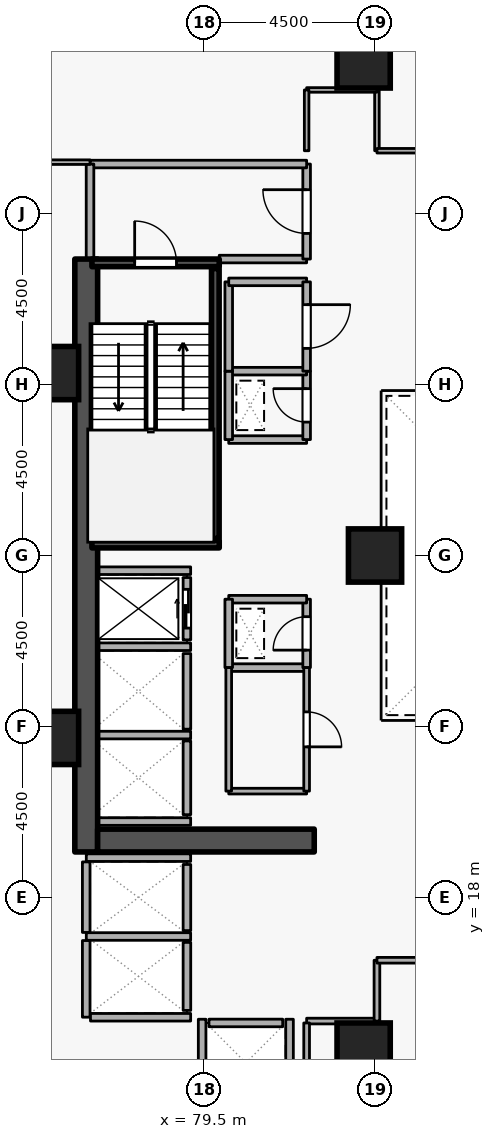
"""IFC4 building model, lengths in metres.
Left out: names, types, materials, properties, quantities, classifications, styles, units other than length and angle.
Written with IfcOpenShell. Run it as: python <this file> out.ifc"""

import sys

from ifc_helpers import new_model, si_unit, direction, frame, frame_2d, origin, origin_2d, place, context, subcontext, project, spatial, rectangle, extrude, element, fill, save


model = new_model("IFC4")
c1 = context("Model", 3, precision=1e-05, world=origin(), true_north=direction((0.0, 1.0)))
c2 = subcontext(c1, "Body", "Model", "MODEL_VIEW")
j1 = project(units=[si_unit("LENGTHUNIT", "METRE"), si_unit("PLANEANGLEUNIT", "RADIAN")], contexts=[c1])
p1 = place(None, origin())
s1 = spatial("IfcSite", under=j1, at=p1, CompositionType="ELEMENT")
p2 = place(p1, origin())
s2 = spatial("IfcBuilding", under=s1, at=p2, CompositionType="ELEMENT")
p3 = place(p2, frame((0.0, 0.0, 35.1)))
s3 = spatial("IfcBuildingStorey", under=s2, at=p3, CompositionType="ELEMENT", Elevation=35.1)
p4 = place(p3, frame((76.4, 19.2, 0.0), z_axis=(0.0, 0.0, 1.0), x_axis=(0.0, 1.0, 0.0)))
e1 = element("IfcWall", 1, at=p4, inside=s3, PredefinedType="SHEAR", context=c2, shape_type="SweptSolid", body=[
    extrude(rectangle(XDim=15.6, YDim=0.6, at=frame_2d((7.8, 0.0))), origin(), (0.0, 0.0, 1.0), 3.6),
])
p5 = place(p3, frame((76.7, 19.5, 0.0), z_axis=(0.0, 0.0, 1.0), x_axis=(1.0, 0.0, 0.0)))
e2 = element("IfcWall", 2, at=p5, inside=s3, PredefinedType="SHEAR", context=c2, shape_type="SweptSolid", body=[
    extrude(rectangle(XDim=5.7, YDim=0.6, at=frame_2d((2.85, 0.0))), origin(), (0.0, 0.0, 1.0), 3.6),
])
for number, where, z_axis, x_axis in (
    (3, (83.7, 14.0, 0.0), (0.0, 0.0, 1.0), (1.0, 0.0, 0.0)),
    (4, (83.7, 40.0, 0.0), (0.0, 0.0, 1.0), (1.0, 0.0, 0.0)),
    (5, (75.5, 22.2, 0.0), (0.0, 0.0, 1.0), (1.0, 0.0, 0.0)),
    (6, (75.5, 31.8, 0.0), (0.0, 0.0, 1.0), (1.0, 0.0, 0.0)),
    (7, (84.0, 27.0, 0.0), (0.0, 0.0, 1.0), (1.0, 0.0, 0.0)),
):
    element("IfcColumn", number, at=place(p3, frame(where, z_axis=z_axis, x_axis=x_axis)), inside=s3, PredefinedType="COLUMN", context=c2, shape_type="SweptSolid", body=[
        extrude(rectangle(XDim=1.4, YDim=1.4, at=origin_2d()), origin(), (0.0, 0.0, 1.0), 3.6),
    ])
p6 = place(p3, frame((79.05, 24.78, 0.0), z_axis=(0.0, 0.0, 1.0), x_axis=(0.0, 1.0, 0.0)))
e8 = element("IfcWall", 8, at=p6, inside=s3, PredefinedType="STANDARD", context=c2, shape_type="SweptSolid", body=[
    extrude(rectangle(XDim=1.64, YDim=0.2, at=frame_2d((0.82, 0.0))), origin(), (0.0, 0.0, 1.0), 3.34),
])
p7 = place(p6, frame((0.31, 0.0, 0.0)))
e9 = element("IfcOpeningElement", 9, at=p7, cuts=e8, PredefinedType="OPENING", context=c2, shape_type="SweptSolid", body=[
    extrude(rectangle(XDim=1.02, YDim=2.06, at=frame_2d((0.51, 1.03))), frame((0.0, 0.11, 0.0), z_axis=(0.0, -1.0, 0.0), x_axis=(1.0, 0.0, 0.0)), (0.0, 0.0, 1.0), 0.22),
])
p8 = place(p3, frame((79.05, 22.43, 0.0), z_axis=(0.0, 0.0, 1.0), x_axis=(0.0, 1.0, 0.0)))
e10 = element("IfcWall", 10, at=p8, inside=s3, PredefinedType="STANDARD", context=c2, shape_type="SweptSolid", body=[
    extrude(rectangle(XDim=1.99, YDim=0.2, at=frame_2d((0.995, 0.0))), origin(), (0.0, 0.0, 1.0), 3.34),
])
p9 = place(p3, frame((79.05, 20.18, 0.0), z_axis=(0.0, 0.0, 1.0), x_axis=(0.0, 1.0, 0.0)))
e11 = element("IfcWall", 11, at=p9, inside=s3, PredefinedType="STANDARD", context=c2, shape_type="SweptSolid", body=[
    extrude(rectangle(XDim=1.94, YDim=0.2, at=frame_2d((0.97, 0.0))), origin(), (0.0, 0.0, 1.0), 3.34),
])
p10 = place(p3, frame((79.05, 17.13, 0.0), z_axis=(0.0, 0.0, 1.0), x_axis=(0.0, 1.0, 0.0)))
e12 = element("IfcWall", 12, at=p10, inside=s3, PredefinedType="STANDARD", context=c2, shape_type="SweptSolid", body=[
    extrude(rectangle(XDim=1.74, YDim=0.2, at=frame_2d((0.87, 0.0))), origin(), (0.0, 0.0, 1.0), 3.34),
])
p11 = place(p3, frame((79.05, 15.03, 0.0), z_axis=(0.0, 0.0, 1.0), x_axis=(0.0, 1.0, 0.0)))
e13 = element("IfcWall", 13, at=p11, inside=s3, PredefinedType="STANDARD", context=c2, shape_type="SweptSolid", body=[
    extrude(rectangle(XDim=1.79, YDim=0.2, at=frame_2d((0.895, 0.0))), origin(), (0.0, 0.0, 1.0), 3.34),
])
p12 = place(p3, frame((79.63, 14.7, 0.0), z_axis=(0.0, 0.0, 1.0), x_axis=(1.0, 0.0, 0.0)))
e14 = element("IfcWall", 14, at=p12, inside=s3, PredefinedType="STANDARD", context=c2, shape_type="SweptSolid", body=[
    extrude(rectangle(XDim=1.94, YDim=0.2, at=frame_2d((0.97, 0.0))), origin(), (0.0, 0.0, 1.0), 3.34),
])
for number, where, z_axis, x_axis in (
    (15, (76.712, 26.6, 0.0), (0.0, 0.0, 1.0), (1.0, 0.0, 0.0)),
    (16, (76.712, 24.6, 0.0), (0.0, 0.0, 1.0), (1.0, 0.0, 0.0)),
    (17, (76.712, 22.275, 0.0), (0.0, 0.0, 1.0), (1.0, 0.0, 0.0)),
    (18, (76.712, 20.0, 0.0), (0.0, 0.0, 1.0), (1.0, 0.0, 0.0)),
):
    element("IfcWall", number, at=place(p3, frame(where, z_axis=z_axis, x_axis=x_axis)), inside=s3, PredefinedType="STANDARD", context=c2, shape_type="SweptSolid", body=[
        extrude(rectangle(XDim=2.436, YDim=0.2, at=frame_2d((1.218, 0.0))), origin(), (0.0, 0.0, 1.0), 3.34),
    ])
p13 = place(p3, frame((76.402, 19.05, 0.0), z_axis=(0.0, 0.0, 1.0), x_axis=(1.0, 0.0, 0.0)))
e19 = element("IfcWall", 19, at=p13, inside=s3, PredefinedType="STANDARD", context=c2, shape_type="SweptSolid", body=[
    extrude(rectangle(XDim=2.746, YDim=0.2, at=frame_2d((1.373, 0.0))), origin(), (0.0, 0.0, 1.0), 2.545),
])
p14 = place(p3, frame((76.402, 16.975, 0.0), z_axis=(0.0, 0.0, 1.0), x_axis=(1.0, 0.0, 0.0)))
e20 = element("IfcWall", 20, at=p14, inside=s3, PredefinedType="STANDARD", context=c2, shape_type="SweptSolid", body=[
    extrude(rectangle(XDim=2.746, YDim=0.2, at=frame_2d((1.373, 0.0))), origin(), (0.0, 0.0, 1.0), 3.34),
])
p15 = place(p3, frame((76.4, 14.852, 0.0), z_axis=(0.0, 0.0, 1.0), x_axis=(0.0, 1.0, 0.0)))
e21 = element("IfcWall", 21, at=p15, inside=s3, PredefinedType="STANDARD", context=c2, shape_type="SweptSolid", body=[
    extrude(rectangle(XDim=2.016, YDim=0.2, at=frame_2d((1.008, 0.0))), origin(), (0.0, 0.0, 1.0), 3.34),
])
p16 = place(p3, frame((76.4, 17.082, 0.0), z_axis=(0.0, 0.0, 1.0), x_axis=(0.0, 1.0, 0.0)))
e22 = element("IfcWall", 22, at=p16, inside=s3, PredefinedType="STANDARD", context=c2, shape_type="SweptSolid", body=[
    extrude(rectangle(XDim=1.856, YDim=0.2, at=frame_2d((0.928, 0.0))), origin(), (0.0, 0.0, 1.0), 3.34),
])
p17 = place(p3, frame((76.512, 14.85, 0.0), z_axis=(0.0, 0.0, 1.0), x_axis=(1.0, 0.0, 0.0)))
e23 = element("IfcWall", 23, at=p17, inside=s3, PredefinedType="STANDARD", context=c2, shape_type="SweptSolid", body=[
    extrude(rectangle(XDim=2.636, YDim=0.2, at=frame_2d((1.318, 0.0))), origin(), (0.0, 0.0, 1.0), 3.34),
])
for number, where, z_axis, x_axis in (
    (24, (81.75, 12.612, 0.0), (0.0, 0.0, 1.0), (0.0, 1.0, 0.0)),
    (25, (79.45, 12.612, 0.0), (0.0, 0.0, 1.0), (0.0, 1.0, 0.0)),
):
    element("IfcWall", number, at=place(p3, frame(where, z_axis=z_axis, x_axis=x_axis)), inside=s3, PredefinedType="STANDARD", context=c2, shape_type="SweptSolid", body=[
        extrude(rectangle(XDim=2.186, YDim=0.2, at=frame_2d((1.093, 0.0))), origin(), (0.0, 0.0, 1.0), 3.34),
    ])
p18 = place(p3, frame((76.55, 34.7, 0.0), z_axis=(0.0, 0.0, 1.0), x_axis=(1.0, 0.0, 0.0)))
e26 = element("IfcWall", 26, at=p18, inside=s3, PredefinedType="SHEAR", context=c2, shape_type="SweptSolid", body=[
    extrude(rectangle(XDim=3.35, YDim=0.2, at=frame_2d((1.675, 0.0))), origin(), (0.0, 0.0, 1.0), 3.6),
])
p19 = place(p18, frame((1.125, 0.0, 0.0)))
e27 = element("IfcOpeningElement", 27, at=p19, cuts=e26, PredefinedType="OPENING", context=c2, shape_type="SweptSolid", body=[
    extrude(rectangle(XDim=1.1, YDim=2.1, at=frame_2d((0.55, 1.05))), frame((0.0, 0.11, 0.0), z_axis=(0.0, -1.0, 0.0), x_axis=(1.0, 0.0, 0.0)), (0.0, 0.0, 1.0), 0.22),
])
p20 = place(p3, frame((79.9, 27.3, 0.0), z_axis=(0.0, 0.0, 1.0), x_axis=(-1.0, 0.0, 0.0)))
e28 = element("IfcWall", 28, at=p20, inside=s3, PredefinedType="SHEAR", context=c2, shape_type="SweptSolid", body=[
    extrude(rectangle(XDim=3.35, YDim=0.2, at=frame_2d((1.675, 0.0))), origin(), (0.0, 0.0, 1.0), 3.6),
])
p21 = place(p3, frame((79.797, 27.45, 0.0), z_axis=(0.0, 0.0, 1.0), x_axis=(0.0, 1.0, 0.0)))
e29 = element("IfcWall", 29, at=p21, inside=s3, PredefinedType="SHEAR", context=c2, shape_type="SweptSolid", body=[
    extrude(rectangle(XDim=7.1, YDim=0.2, at=frame_2d((3.55, 0.0))), origin(), (0.0, 0.0, 1.0), 3.6),
])
p22 = place(p3, frame((79.9, 34.8, 0.0), z_axis=(0.0, 0.0, 1.0), x_axis=(1.0, 0.0, 0.0)))
e30 = element("IfcWall", 30, at=p22, inside=s3, PredefinedType="STANDARD", context=c2, shape_type="SweptSolid", body=[
    extrude(rectangle(XDim=2.3, YDim=0.2, at=frame_2d((1.15, 0.0))), origin(), (0.0, 0.0, 1.0), 2.545),
])
p23 = place(p3, frame((82.2, 34.8, 0.0), z_axis=(0.0, 0.0, 1.0), x_axis=(0.0, 1.0, 0.0)))
e31 = element("IfcWall", 31, at=p23, inside=s3, PredefinedType="STANDARD", context=c2, shape_type="SweptSolid", body=[
    extrude(rectangle(XDim=2.5, YDim=0.2, at=frame_2d((1.25, 0.0))), origin(), (0.0, 0.0, 1.0), 3.34),
])
p24 = place(p23, frame((0.675, 0.0, 0.0)))
e32 = element("IfcOpeningElement", 32, at=p24, cuts=e31, PredefinedType="OPENING", context=c2, shape_type="SweptSolid", body=[
    extrude(rectangle(XDim=1.15, YDim=2.1, at=frame_2d((0.575, 1.05))), frame((0.0, 0.11, 0.0), z_axis=(0.0, -1.0, 0.0), x_axis=(1.0, 0.0, 0.0)), (0.0, 0.0, 1.0), 0.22),
])
p25 = place(p3, frame((82.2, 37.3, 0.0), z_axis=(0.0, 0.0, 1.0), x_axis=(-1.0, 0.0, 0.0)))
e33 = element("IfcWall", 33, at=p25, inside=s3, PredefinedType="STANDARD", context=c2, shape_type="SweptSolid", body=[
    extrude(rectangle(XDim=5.7, YDim=0.2, at=frame_2d((2.85, 0.0))), origin(), (0.0, 0.0, 1.0), 3.34),
])
p26 = place(p3, frame((76.5, 37.3, 0.0), z_axis=(0.0, 0.0, 1.0), x_axis=(0.0, -1.0, 0.0)))
e34 = element("IfcWall", 34, at=p26, inside=s3, PredefinedType="STANDARD", context=c2, shape_type="SweptSolid", body=[
    extrude(rectangle(XDim=2.5, YDim=0.2, at=frame_2d((1.25, 0.0))), origin(), (0.0, 0.0, 1.0), 3.34),
])
p27 = place(p3, frame((80.15, 24.05, 0.0), z_axis=(0.0, 0.0, 1.0), x_axis=(1.0, 0.0, 0.0)))
e35 = element("IfcWall", 35, at=p27, inside=s3, PredefinedType="STANDARD", context=c2, shape_type="SweptSolid", body=[
    extrude(rectangle(XDim=2.05, YDim=0.2, at=frame_2d((1.025, 0.0))), origin(), (0.0, 0.0, 1.0), 3.34),
])
p28 = place(p3, frame((82.2, 24.05, 0.0), z_axis=(0.0, 0.0, 1.0), x_axis=(0.0, 1.0, 0.0)))
e36 = element("IfcWall", 36, at=p28, inside=s3, PredefinedType="STANDARD", context=c2, shape_type="SweptSolid", body=[
    extrude(rectangle(XDim=1.8, YDim=0.2, at=frame_2d((0.9, 0.0))), origin(), (0.0, 0.0, 1.0), 3.34),
])
p29 = place(p28, frame((0.46, 0.0, 0.0)))
e37 = element("IfcOpeningElement", 37, at=p29, cuts=e36, PredefinedType="OPENING", context=c2, shape_type="SweptSolid", body=[
    extrude(rectangle(XDim=0.88, YDim=2.04, at=frame_2d((0.44, 1.02))), frame((0.0, 0.11, 0.0), z_axis=(0.0, -1.0, 0.0), x_axis=(1.0, 0.0, 0.0)), (0.0, 0.0, 1.0), 0.22),
])
p30 = place(p3, frame((82.2, 25.85, 0.0), z_axis=(0.0, 0.0, 1.0), x_axis=(-1.0, 0.0, 0.0)))
e38 = element("IfcWall", 38, at=p30, inside=s3, PredefinedType="STANDARD", context=c2, shape_type="SweptSolid", body=[
    extrude(rectangle(XDim=2.05, YDim=0.2, at=frame_2d((1.025, 0.0))), origin(), (0.0, 0.0, 1.0), 3.34),
])
p31 = place(p3, frame((80.15, 25.85, 0.0), z_axis=(0.0, 0.0, 1.0), x_axis=(0.0, -1.0, 0.0)))
e39 = element("IfcWall", 39, at=p31, inside=s3, PredefinedType="STANDARD", context=c2, shape_type="SweptSolid", body=[
    extrude(rectangle(XDim=1.8, YDim=0.2, at=frame_2d((0.9, 0.0))), origin(), (0.0, 0.0, 1.0), 3.34),
])
p32 = place(p3, frame((80.15, 30.05, 0.0), z_axis=(0.0, 0.0, 1.0), x_axis=(1.0, 0.0, 0.0)))
e40 = element("IfcWall", 40, at=p32, inside=s3, PredefinedType="STANDARD", context=c2, shape_type="SweptSolid", body=[
    extrude(rectangle(XDim=2.05, YDim=0.2, at=frame_2d((1.025, 0.0))), origin(), (0.0, 0.0, 1.0), 3.34),
])
p33 = place(p3, frame((82.2, 30.05, 0.0), z_axis=(0.0, 0.0, 1.0), x_axis=(0.0, 1.0, 0.0)))
e41 = element("IfcWall", 41, at=p33, inside=s3, PredefinedType="STANDARD", context=c2, shape_type="SweptSolid", body=[
    extrude(rectangle(XDim=1.8, YDim=0.2, at=frame_2d((0.9, 0.0))), origin(), (0.0, 0.0, 1.0), 3.34),
])
p34 = place(p33, frame((0.46, 0.0, 0.0)))
e42 = element("IfcOpeningElement", 42, at=p34, cuts=e41, PredefinedType="OPENING", context=c2, shape_type="SweptSolid", body=[
    extrude(rectangle(XDim=0.88, YDim=2.04, at=frame_2d((0.44, 1.02))), frame((0.0, 0.11, 0.0), z_axis=(0.0, -1.0, 0.0), x_axis=(1.0, 0.0, 0.0)), (0.0, 0.0, 1.0), 0.22),
])
p35 = place(p3, frame((82.2, 31.85, 0.0), z_axis=(0.0, 0.0, 1.0), x_axis=(-1.0, 0.0, 0.0)))
e43 = element("IfcWall", 43, at=p35, inside=s3, PredefinedType="STANDARD", context=c2, shape_type="SweptSolid", body=[
    extrude(rectangle(XDim=2.05, YDim=0.2, at=frame_2d((1.025, 0.0))), origin(), (0.0, 0.0, 1.0), 3.34),
])
p36 = place(p3, frame((80.15, 31.85, 0.0), z_axis=(0.0, 0.0, 1.0), x_axis=(0.0, -1.0, 0.0)))
e44 = element("IfcWall", 44, at=p36, inside=s3, PredefinedType="STANDARD", context=c2, shape_type="SweptSolid", body=[
    extrude(rectangle(XDim=1.8, YDim=0.2, at=frame_2d((0.9, 0.0))), origin(), (0.0, 0.0, 1.0), 3.34),
])
p37 = place(p3, frame((80.15, 31.85, 0.0), z_axis=(0.0, 0.0, 1.0), x_axis=(0.0, 1.0, 0.0)))
e45 = element("IfcWall", 45, at=p37, inside=s3, PredefinedType="STANDARD", context=c2, shape_type="SweptSolid", body=[
    extrude(rectangle(XDim=2.35, YDim=0.2, at=frame_2d((1.175, 0.0))), origin(), (0.0, 0.0, 1.0), 3.34),
])
p38 = place(p3, frame((80.15, 34.2, 0.0), z_axis=(0.0, 0.0, 1.0), x_axis=(1.0, 0.0, 0.0)))
e46 = element("IfcWall", 46, at=p38, inside=s3, PredefinedType="STANDARD", context=c2, shape_type="SweptSolid", body=[
    extrude(rectangle(XDim=2.05, YDim=0.2, at=frame_2d((1.025, 0.0))), origin(), (0.0, 0.0, 1.0), 2.545),
])
p39 = place(p3, frame((82.2, 34.2, 0.0), z_axis=(0.0, 0.0, 1.0), x_axis=(0.0, -1.0, 0.0)))
e47 = element("IfcWall", 47, at=p39, inside=s3, PredefinedType="STANDARD", context=c2, shape_type="SweptSolid", body=[
    extrude(rectangle(XDim=2.35, YDim=0.2, at=frame_2d((1.175, 0.0))), origin(), (0.0, 0.0, 1.0), 3.34),
])
p40 = place(p39, frame((0.6, 0.0, 0.0)))
e48 = element("IfcOpeningElement", 48, at=p40, cuts=e47, PredefinedType="OPENING", context=c2, shape_type="SweptSolid", body=[
    extrude(rectangle(XDim=1.15, YDim=2.1, at=frame_2d((0.575, 1.05))), frame((0.0, 0.11, 0.0), z_axis=(0.0, -1.0, 0.0), x_axis=(1.0, 0.0, 0.0)), (0.0, 0.0, 1.0), 0.22),
])
p41 = place(p3, frame((82.2, 20.8, 0.0), z_axis=(0.0, 0.0, 1.0), x_axis=(-1.0, 0.0, 0.0)))
e49 = element("IfcWall", 49, at=p41, inside=s3, PredefinedType="PARTITIONING", context=c2, shape_type="SweptSolid", body=[
    extrude(rectangle(XDim=2.05, YDim=0.15, at=frame_2d((1.025, 0.0))), origin(), (0.0, 0.0, 1.0), 3.34),
])
p42 = place(p3, frame((80.15, 20.8, 0.0), z_axis=(0.0, 0.0, 1.0), x_axis=(0.0, 1.0, 0.0)))
e50 = element("IfcWall", 50, at=p42, inside=s3, PredefinedType="PARTITIONING", context=c2, shape_type="SweptSolid", body=[
    extrude(rectangle(XDim=3.25, YDim=0.15, at=frame_2d((1.625, 0.0))), origin(), (0.0, 0.0, 1.0), 3.34),
])
p43 = place(p3, frame((82.2, 24.05, 0.0), z_axis=(0.0, 0.0, 1.0), x_axis=(0.0, -1.0, 0.0)))
e51 = element("IfcWall", 51, at=p43, inside=s3, PredefinedType="PARTITIONING", context=c2, shape_type="SweptSolid", body=[
    extrude(rectangle(XDim=3.25, YDim=0.15, at=frame_2d((1.625, 0.0))), origin(), (0.0, 0.0, 1.0), 3.34),
])
p44 = place(p43, frame((1.165, 0.0, 0.0)))
e52 = element("IfcOpeningElement", 52, at=p44, cuts=e51, PredefinedType="OPENING", context=c2, shape_type="SweptSolid", body=[
    extrude(rectangle(XDim=0.92, YDim=2.08, at=frame_2d((0.46, 1.04))), frame((0.0, 0.085, 0.0), z_axis=(0.0, -1.0, 0.0), x_axis=(1.0, 0.0, 0.0)), (0.0, 0.0, 1.0), 0.17),
])
p45 = place(p3, frame((82.2, 14.75, 0.0), z_axis=(0.0, 0.0, 1.0), x_axis=(1.0, 0.0, 0.0)))
e53 = element("IfcWall", 53, at=p45, inside=s3, PredefinedType="PARTITIONING", context=c2, shape_type="SweptSolid", body=[
    extrude(rectangle(XDim=1.85, YDim=0.15, at=frame_2d((0.925, 0.0))), origin(), (0.0, 0.0, 1.0), 3.34),
])
p46 = place(p3, frame((84.05, 14.75, 0.0), z_axis=(0.0, 0.0, 1.0), x_axis=(0.0, 1.0, 0.0)))
e54 = element("IfcWall", 54, at=p46, inside=s3, PredefinedType="PARTITIONING", context=c2, shape_type="SweptSolid", body=[
    extrude(rectangle(XDim=1.6, YDim=0.15, at=frame_2d((0.8, 0.0))), origin(), (0.0, 0.0, 1.0), 3.34),
])
p47 = place(p3, frame((84.05, 16.35, 0.0), z_axis=(0.0, 0.0, 1.0), x_axis=(1.0, 0.0, 0.0)))
e55 = element("IfcWall", 55, at=p47, inside=s3, PredefinedType="PARTITIONING", context=c2, shape_type="SweptSolid", body=[
    extrude(rectangle(XDim=4.45, YDim=0.15, at=frame_2d((2.225, 0.0))), origin(), (0.0, 0.0, 1.0), 3.34),
])
p48 = place(p47, frame((1.575, 0.0, 0.0)))
e56 = element("IfcOpeningElement", 56, at=p48, cuts=e55, PredefinedType="OPENING", context=c2, shape_type="SweptSolid", body=[
    extrude(rectangle(XDim=1.3, YDim=2.12, at=frame_2d((0.65, 1.06))), frame((0.0, 0.085, 0.0), z_axis=(0.0, -1.0, 0.0), x_axis=(1.0, 0.0, 0.0)), (0.0, 0.0, 1.0), 0.17),
])
p49 = place(p3, frame((82.2, 12.4, 0.0), z_axis=(0.0, 0.0, 1.0), x_axis=(0.0, 1.0, 0.0)))
e57 = element("IfcWall", 57, at=p49, inside=s3, PredefinedType="PARTITIONING", context=c2, shape_type="SweptSolid", body=[
    extrude(rectangle(XDim=2.3, YDim=0.15, at=frame_2d((1.15, 0.0))), origin(), (0.0, 0.0, 1.0), 3.34),
])
p50 = place(p3, frame((84.05, 37.65, 0.0), z_axis=(0.0, 0.0, 1.0), x_axis=(0.0, 1.0, 0.0)))
e58 = element("IfcWall", 58, at=p50, inside=s3, PredefinedType="PARTITIONING", context=c2, shape_type="SweptSolid", body=[
    extrude(rectangle(XDim=1.6, YDim=0.12, at=frame_2d((0.8, 0.0))), origin(), (0.0, 0.0, 1.0), 3.34),
])
p51 = place(p3, frame((84.05, 39.25, 0.0), z_axis=(0.0, 0.0, 1.0), x_axis=(-1.0, 0.0, 0.0)))
e59 = element("IfcWall", 59, at=p51, inside=s3, PredefinedType="PARTITIONING", context=c2, shape_type="SweptSolid", body=[
    extrude(rectangle(XDim=1.85, YDim=0.12, at=frame_2d((0.925, 0.0))), origin(), (0.0, 0.0, 1.0), 3.34),
])
p52 = place(p3, frame((82.2, 39.25, 0.0), z_axis=(0.0, 0.0, 1.0), x_axis=(0.0, -1.0, 0.0)))
e60 = element("IfcWall", 60, at=p52, inside=s3, PredefinedType="PARTITIONING", context=c2, shape_type="SweptSolid", body=[
    extrude(rectangle(XDim=1.6, YDim=0.12, at=frame_2d((0.8, 0.0))), origin(), (0.0, 0.0, 1.0), 3.34),
])
p53 = place(p3, frame((76.5, 37.35, 0.0), z_axis=(0.0, 0.0, 1.0), x_axis=(-1.0, 0.0, 0.0)))
e61 = element("IfcWall", 61, at=p53, inside=s3, PredefinedType="PARTITIONING", context=c2, shape_type="SweptSolid", body=[
    extrude(rectangle(XDim=6.22, YDim=0.12, at=frame_2d((3.11, 0.0))), origin(), (0.0, 0.0, 1.0), 3.34),
])
p54 = place(p3, frame((70.28, 39.781, 0.0), z_axis=(0.0, 0.0, 1.0), x_axis=(0.707106781187, 0.707106781187, 0.0)))
e62 = element("IfcWall", 62, at=p54, inside=s3, PredefinedType="PARTITIONING", context=c2, shape_type="SweptSolid", body=[
    extrude(rectangle(XDim=7.693, YDim=0.12, at=frame_2d((3.846, 0.0))), origin(), (0.0, 0.0, 1.0), 3.34),
])
p55 = place(p3, frame((88.5, 37.65, 0.0), z_axis=(0.0, 0.0, 1.0), x_axis=(-1.0, 0.0, 0.0)))
e63 = element("IfcWall", 63, at=p55, inside=s3, PredefinedType="PARTITIONING", context=c2, shape_type="SweptSolid", body=[
    extrude(rectangle(XDim=4.45, YDim=0.12, at=frame_2d((2.225, 0.0))), origin(), (0.0, 0.0, 1.0), 3.34),
])
p56 = place(p55, frame((1.7, 0.0, 0.0)))
e64 = element("IfcOpeningElement", 64, at=p56, cuts=e63, PredefinedType="OPENING", context=c2, shape_type="SweptSolid", body=[
    extrude(rectangle(XDim=1.05, YDim=2.1, at=frame_2d((0.525, 1.05))), frame((0.0, 0.07, 0.0), z_axis=(0.0, -1.0, 0.0), x_axis=(1.0, 0.0, 0.0)), (0.0, 0.0, 1.0), 0.14),
])
p57 = place(p7, origin())
e65 = element("IfcDoor", 65, at=p57, inside=s3, OperationType="SLIDING_TO_LEFT", PredefinedType="DOOR", context=c2, shape_type="SweptSolid", body=[
    extrude(rectangle(XDim=1.02, YDim=2.06, at=frame_2d((0.51, 1.03))), frame((0.0, 0.025, 0.0), z_axis=(0.0, -1.0, 0.0), x_axis=(1.0, 0.0, 0.0)), (0.0, 0.0, 1.0), 0.05),
])
fill(e9, e65)
p58 = place(p19, origin())
e66 = element("IfcDoor", 66, at=p58, inside=s3, OperationType="SINGLE_SWING_LEFT", PredefinedType="DOOR", context=c2, shape_type="SweptSolid", body=[
    extrude(rectangle(XDim=1.1, YDim=2.1, at=frame_2d((0.55, 1.05))), frame((0.0, 0.025, 0.0), z_axis=(0.0, -1.0, 0.0), x_axis=(1.0, 0.0, 0.0)), (0.0, 0.0, 1.0), 0.05),
])
fill(e27, e66)
p59 = place(p24, origin())
e67 = element("IfcDoor", 67, at=p59, inside=s3, OperationType="SINGLE_SWING_RIGHT", PredefinedType="DOOR", context=c2, shape_type="SweptSolid", body=[
    extrude(rectangle(XDim=1.15, YDim=2.1, at=frame_2d((0.575, 1.05))), frame((0.0, 0.025, 0.0), z_axis=(0.0, -1.0, 0.0), x_axis=(1.0, 0.0, 0.0)), (0.0, 0.0, 1.0), 0.05),
])
fill(e32, e67)
p60 = place(p29, origin())
e68 = element("IfcDoor", 68, at=p60, inside=s3, OperationType="SINGLE_SWING_LEFT", PredefinedType="DOOR", context=c2, shape_type="SweptSolid", body=[
    extrude(rectangle(XDim=0.88, YDim=2.04, at=frame_2d((0.44, 1.02))), frame((0.0, 0.025, 0.0), z_axis=(0.0, -1.0, 0.0), x_axis=(1.0, 0.0, 0.0)), (0.0, 0.0, 1.0), 0.05),
])
fill(e37, e68)
p61 = place(p34, origin())
e69 = element("IfcDoor", 69, at=p61, inside=s3, OperationType="SINGLE_SWING_RIGHT", PredefinedType="DOOR", context=c2, shape_type="SweptSolid", body=[
    extrude(rectangle(XDim=0.88, YDim=2.04, at=frame_2d((0.44, 1.02))), frame((0.0, 0.025, 0.0), z_axis=(0.0, -1.0, 0.0), x_axis=(1.0, 0.0, 0.0)), (0.0, 0.0, 1.0), 0.05),
])
fill(e42, e69)
p62 = place(p44, origin())
e70 = element("IfcDoor", 70, at=p62, inside=s3, OperationType="SINGLE_SWING_RIGHT", PredefinedType="DOOR", context=c2, shape_type="SweptSolid", body=[
    extrude(rectangle(XDim=0.92, YDim=2.08, at=frame_2d((0.46, 1.04))), frame((0.0, 0.025, 0.0), z_axis=(0.0, -1.0, 0.0), x_axis=(1.0, 0.0, 0.0)), (0.0, 0.0, 1.0), 0.05),
])
fill(e52, e70)
p63 = place(p40, origin())
e71 = element("IfcDoor", 71, at=p63, inside=s3, OperationType="SINGLE_SWING_LEFT", PredefinedType="DOOR", context=c2, shape_type="SweptSolid", body=[
    extrude(rectangle(XDim=1.15, YDim=2.1, at=frame_2d((0.575, 1.05))), frame((0.0, 0.025, 0.0), z_axis=(0.0, -1.0, 0.0), x_axis=(1.0, 0.0, 0.0)), (0.0, 0.0, 1.0), 0.05),
])
fill(e48, e71)
save(model, sys.argv[1])
